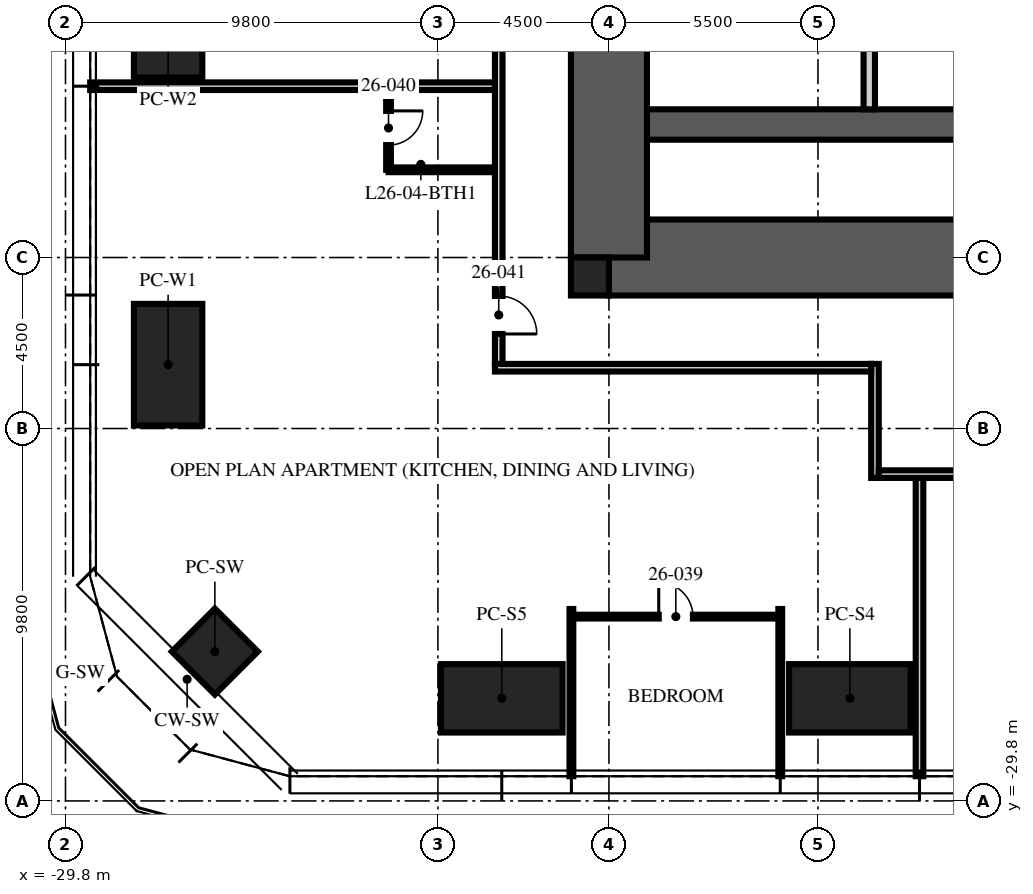
"""IFC4 building model, lengths in metres.
Left out: names, types, materials, properties, quantities, classifications, styles, units other than length and angle.
Written with IfcOpenShell. Run it as: python <this file> out.ifc"""

import sys

from ifc_helpers import new_model, si_unit, direction, frame, frame_2d, origin, origin_2d, place, context, subcontext, project, spatial, rectangle, hollow_rectangle, extrude, element, fill, save


model = new_model("IFC4")
c1 = context("Model", 3, precision=1e-05, world=origin(), true_north=direction((0.0, 1.0)))
c2 = subcontext(c1, "Body", "Model", "MODEL_VIEW")
j1 = project(units=[si_unit("LENGTHUNIT", "METRE"), si_unit("PLANEANGLEUNIT", "RADIAN")], contexts=[c1])
p1 = place(None, origin())
s1 = spatial("IfcSite", under=j1, at=p1, CompositionType="ELEMENT")
p2 = place(p1, origin())
s2 = spatial("IfcBuilding", under=s1, at=p2, CompositionType="ELEMENT")
p3 = place(p2, frame((0.0, 0.0, 107.25)))
s3 = spatial("IfcBuildingStorey", under=s2, at=p3, CompositionType="ELEMENT", Elevation=107.25)
p4 = place(p3, frame((-15.5, -15.5, -0.25), z_axis=(0.0, 0.0, 1.0), x_axis=(1.0, 0.0, 0.0)))
e1 = element("IfcWall", 1, at=p4, inside=s3, PredefinedType="SHEAR", context=c2, shape_type="SweptSolid", body=[
    extrude(rectangle(XDim=31.0, YDim=2.0, at=frame_2d((15.5, 0.0))), origin(), (0.0, 0.0, 1.0), 3.75),
])
p5 = place(p4, frame((10.4, 0.0, 0.25)))
e2 = element("IfcOpeningElement", 2, at=p5, cuts=e1, PredefinedType="OPENING", context=c2, shape_type="SweptSolid", body=[
    extrude(rectangle(XDim=1.1, YDim=2.1, at=frame_2d((0.55, 1.05))), frame((0.0, 1.01, 0.0), z_axis=(0.0, -1.0, 0.0), x_axis=(1.0, 0.0, 0.0)), (0.0, 0.0, 1.0), 2.02),
])
p6 = place(p4, frame((13.5, 0.0, 0.25)))
e3 = element("IfcOpeningElement", 3, at=p6, cuts=e1, PredefinedType="OPENING", context=c2, shape_type="SweptSolid", body=[
    extrude(rectangle(XDim=1.1, YDim=2.1, at=frame_2d((0.55, 1.05))), frame((0.0, 1.01, 0.0), z_axis=(0.0, -1.0, 0.0), x_axis=(1.0, 0.0, 0.0)), (0.0, 0.0, 1.0), 2.02),
])
p7 = place(p4, frame((16.6, 0.0, 0.25)))
e4 = element("IfcOpeningElement", 4, at=p7, cuts=e1, PredefinedType="OPENING", context=c2, shape_type="SweptSolid", body=[
    extrude(rectangle(XDim=1.1, YDim=2.1, at=frame_2d((0.55, 1.05))), frame((0.0, 1.01, 0.0), z_axis=(0.0, -1.0, 0.0), x_axis=(1.0, 0.0, 0.0)), (0.0, 0.0, 1.0), 2.02),
])
p8 = place(p3, frame((-15.5, -12.0, -0.25), z_axis=(0.0, 0.0, 1.0), x_axis=(1.0, 0.0, 0.0)))
e5 = element("IfcWall", 5, at=p8, inside=s3, PredefinedType="SHEAR", context=c2, shape_type="SweptSolid", body=[
    extrude(rectangle(XDim=31.0, YDim=0.8, at=frame_2d((15.5, 0.0))), origin(), (0.0, 0.0, 1.0), 3.75),
])
p9 = place(p3, frame((-15.5, -15.5, -0.25), z_axis=(0.0, 0.0, 1.0), x_axis=(0.0, 1.0, 0.0)))
e6 = element("IfcWall", 6, at=p9, inside=s3, PredefinedType="SHEAR", context=c2, shape_type="SweptSolid", body=[
    extrude(rectangle(XDim=31.0, YDim=2.0, at=frame_2d((15.5, 0.0))), origin(), (0.0, 0.0, 1.0), 3.75),
])
p10 = place(p9, frame((6.5, 0.0, 0.25)))
e7 = element("IfcOpeningElement", 7, at=p10, cuts=e6, PredefinedType="OPENING", context=c2, shape_type="SweptSolid", body=[
    extrude(rectangle(XDim=1.2, YDim=2.1, at=frame_2d((0.6, 1.05))), frame((0.0, 1.01, 0.0), z_axis=(0.0, -1.0, 0.0), x_axis=(1.0, 0.0, 0.0)), (0.0, 0.0, 1.0), 2.02),
])
p11 = place(p9, frame((23.0, 0.0, 0.25)))
e8 = element("IfcOpeningElement", 8, at=p11, cuts=e6, PredefinedType="OPENING", context=c2, shape_type="SweptSolid", body=[
    extrude(rectangle(XDim=1.8, YDim=2.1, at=frame_2d((0.9, 1.05))), frame((0.0, 1.01, 0.0), z_axis=(0.0, -1.0, 0.0), x_axis=(1.0, 0.0, 0.0)), (0.0, 0.0, 1.0), 2.02),
])
p12 = place(p3, frame((-16.0, -16.0, -0.25), z_axis=(0.0, 0.0, 1.0), x_axis=(1.0, 0.0, 0.0)))
e9 = element("IfcColumn", 9, at=p12, inside=s3, PredefinedType="COLUMN", context=c2, shape_type="SweptSolid", body=[
    extrude(rectangle(XDim=1.0, YDim=1.0, at=origin_2d()), origin(), (0.0, 0.0, 1.0), 3.75),
])
p13 = place(p3, frame((-9.16, -27.1, -0.07), z_axis=(0.0, 0.0, 1.0), x_axis=(1.0, 0.0, 0.0)))
e10 = element("IfcColumn", 10, at=p13, inside=s3, PredefinedType="COLUMN", context=c2, shape_type="SweptSolid", body=[
    extrude(hollow_rectangle(XDim=3.2, YDim=1.8, WallThickness=0.2, at=origin_2d()), origin(), (0.0, 0.0, 1.0), 3.82),
])
for number, where, z_axis, x_axis in (
    (11, (-18.32, -27.1, 0.08), (0.0, 0.0, 1.0), (1.0, 0.0, 0.0)),
    (12, (-27.1, -18.32, 0.08), (0.0, 0.0, 1.0), (0.0, 1.0, 0.0)),
):
    element("IfcColumn", number, at=place(p3, frame(where, z_axis=z_axis, x_axis=x_axis)), inside=s3, PredefinedType="COLUMN", context=c2, shape_type="SweptSolid", body=[
        extrude(hollow_rectangle(XDim=3.2, YDim=1.8, WallThickness=0.2, at=origin_2d()), origin(), (0.0, 0.0, 1.0), 3.67),
    ])
p14 = place(p3, frame((-27.1, -9.16, -0.07), z_axis=(0.0, 0.0, 1.0), x_axis=(0.0, 1.0, 0.0)))
e13 = element("IfcColumn", 13, at=p14, inside=s3, PredefinedType="COLUMN", context=c2, shape_type="SweptSolid", body=[
    extrude(hollow_rectangle(XDim=3.2, YDim=1.8, WallThickness=0.2, at=origin_2d()), origin(), (0.0, 0.0, 1.0), 3.82),
])
p15 = place(p3, frame((-25.87, -25.87, -0.19), z_axis=(0.0, 0.0, 1.0), x_axis=(0.707106781187, -0.707106781187, 0.0)))
e14 = element("IfcColumn", 14, at=p15, inside=s3, PredefinedType="COLUMN", context=c2, shape_type="SweptSolid", body=[
    extrude(hollow_rectangle(XDim=1.6, YDim=1.6, WallThickness=0.1, at=origin_2d()), origin(), (0.0, 0.0, 1.0), 3.94),
])
p16 = place(p3, frame((-8.65, -11.6, 0.0), z_axis=(0.0, 0.0, 1.0), x_axis=(0.0, 1.0, 0.0)))
e15 = element("IfcWall", 15, at=p16, inside=s3, PredefinedType="PARTITIONING", context=c2, shape_type="SweptSolid", body=[
    extrude(rectangle(XDim=6.7, YDim=0.3, at=frame_2d((3.35, 0.0))), origin(), (0.0, 0.0, 1.0), 3.5),
])
p17 = place(p16, frame((2.85, 0.0, 0.0)))
e16 = element("IfcOpeningElement", 16, at=p17, cuts=e15, PredefinedType="OPENING", context=c2, shape_type="SweptSolid", body=[
    extrude(rectangle(XDim=1.1, YDim=2.1, at=frame_2d((0.55, 1.05))), frame((0.0, 0.16, 0.0), z_axis=(0.0, -1.0, 0.0), x_axis=(1.0, 0.0, 0.0)), (0.0, 0.0, 1.0), 0.32),
])
p18 = place(p3, frame((-18.5, -10.992, 0.0), z_axis=(0.0, 0.0, 1.0), x_axis=(-1.0, 0.0, 0.0)))
e17 = element("IfcWall", 17, at=p18, inside=s3, PredefinedType="PARTITIONING", context=c2, shape_type="SweptSolid", body=[
    extrude(rectangle(XDim=10.65, YDim=0.2, at=frame_2d((5.325, 0.0))), origin(), (0.0, 0.0, 1.0), 2.81),
])
for number, where, z_axis, x_axis in (
    (18, (-16.488, -24.75, 0.0), (0.0, 0.0, 1.0), (0.0, -1.0, 0.0)),
    (19, (-10.992, -24.75, 0.0), (0.0, 0.0, 1.0), (0.0, -1.0, 0.0)),
):
    element("IfcWall", number, at=place(p3, frame(where, z_axis=z_axis, x_axis=x_axis)), inside=s3, PredefinedType="PARTITIONING", context=c2, shape_type="SweptSolid", body=[
        extrude(rectangle(XDim=4.4, YDim=0.1, at=frame_2d((2.2, 0.0))), origin(), (0.0, 0.0, 1.0), 2.81),
    ])
p19 = place(p3, frame((-7.328, -21.3, 0.0), z_axis=(0.0, 0.0, 1.0), x_axis=(0.0, -1.0, 0.0)))
e20 = element("IfcWall", 20, at=p19, inside=s3, PredefinedType="PARTITIONING", context=c2, shape_type="SweptSolid", body=[
    extrude(rectangle(XDim=7.85, YDim=0.2, at=frame_2d((3.925, 0.0))), origin(), (0.0, 0.0, 1.0), 2.81),
])
p20 = place(p3, frame((-16.488, -24.95, 0.0), z_axis=(0.0, 0.0, 1.0), x_axis=(1.0, 0.0, 0.0)))
e21 = element("IfcWall", 21, at=p20, inside=s3, PredefinedType="PARTITIONING", context=c2, shape_type="SweptSolid", body=[
    extrude(rectangle(XDim=5.496, YDim=0.1, at=frame_2d((2.748, 0.0))), origin(), (0.0, 0.0, 1.0), 2.81),
])
p21 = place(p20, frame((2.298, 0.0, 0.0)))
e22 = element("IfcOpeningElement", 22, at=p21, cuts=e21, PredefinedType="OPENING", context=c2, shape_type="SweptSolid", body=[
    extrude(rectangle(XDim=0.9, YDim=2.1, at=frame_2d((0.45, 1.05))), frame((0.0, 0.06, 0.0), z_axis=(0.0, -1.0, 0.0), x_axis=(1.0, 0.0, 0.0)), (0.0, 0.0, 1.0), 0.12),
])
p22 = place(p3, frame((-21.3, -10.992, 0.0), z_axis=(0.0, 0.0, 1.0), x_axis=(0.0, -1.0, 0.0)))
e23 = element("IfcWall", 23, at=p22, inside=s3, PredefinedType="PARTITIONING", context=c2, shape_type="SweptSolid", body=[
    extrude(rectangle(XDim=2.2, YDim=0.125, at=frame_2d((1.1, 0.0))), origin(), (0.0, 0.0, 1.0), 3.5),
])
p23 = place(p22, frame((0.65, 0.0, 0.0)))
e24 = element("IfcOpeningElement", 24, at=p23, cuts=e23, PredefinedType="OPENING", context=c2, shape_type="SweptSolid", body=[
    extrude(rectangle(XDim=0.9, YDim=2.1, at=frame_2d((0.45, 1.05))), frame((0.0, 0.073, 0.0), z_axis=(0.0, -1.0, 0.0), x_axis=(1.0, 0.0, 0.0)), (0.0, 0.0, 1.0), 0.145),
])
p24 = place(p3, frame((-18.5, -13.192, 0.0), z_axis=(0.0, 0.0, 1.0), x_axis=(-1.0, 0.0, 0.0)))
e25 = element("IfcWall", 25, at=p24, inside=s3, PredefinedType="PARTITIONING", context=c2, shape_type="SweptSolid", body=[
    extrude(rectangle(XDim=2.8, YDim=0.125, at=frame_2d((1.4, 0.0))), origin(), (0.0, 0.0, 1.0), 3.5),
])
p25 = place(p3, frame((-18.4, 5.328, 0.0), z_axis=(0.0, 0.0, 1.0), x_axis=(0.0, -1.0, 0.0)))
e26 = element("IfcWall", 26, at=p25, inside=s3, PredefinedType="PARTITIONING", context=c2, shape_type="SweptSolid", body=[
    extrude(rectangle(XDim=23.628, YDim=0.2, at=frame_2d((11.814, 0.0))), origin(), (0.0, 0.0, 1.0), 2.3),
])
p26 = place(p25, frame((21.84, 0.0, 0.0)))
e27 = element("IfcOpeningElement", 27, at=p26, cuts=e26, PredefinedType="OPENING", context=c2, shape_type="SweptSolid", body=[
    extrude(rectangle(XDim=1.0, YDim=2.2, at=frame_2d((0.5, 1.1))), frame((0.0, 0.11, 0.0), z_axis=(0.0, -1.0, 0.0), x_axis=(1.0, 0.0, 0.0)), (0.0, 0.0, 1.0), 0.22),
])
p27 = place(p3, frame((-8.5, -18.3, 0.0), z_axis=(0.0, 0.0, 1.0), x_axis=(0.0, -1.0, 0.0)))
e28 = element("IfcWall", 28, at=p27, inside=s3, PredefinedType="PARTITIONING", context=c2, shape_type="SweptSolid", body=[
    extrude(rectangle(XDim=3.0, YDim=0.2, at=frame_2d((1.5, 0.0))), origin(), (0.0, 0.0, 1.0), 3.5),
])
p28 = place(p3, frame((5.4, -21.2, 0.0), z_axis=(0.0, 0.0, 1.0), x_axis=(-1.0, 0.0, 0.0)))
e29 = element("IfcWall", 29, at=p28, inside=s3, PredefinedType="PARTITIONING", context=c2, shape_type="SweptSolid", body=[
    extrude(rectangle(XDim=13.8, YDim=0.2, at=frame_2d((6.9, 0.0))), origin(), (0.0, 0.0, 1.0), 2.7),
])
p29 = place(p28, frame((0.958, 0.0, 0.0)))
e30 = element("IfcOpeningElement", 30, at=p29, cuts=e29, PredefinedType="OPENING", context=c2, shape_type="SweptSolid", body=[
    extrude(rectangle(XDim=1.0, YDim=2.2, at=frame_2d((0.5, 1.1))), frame((0.0, 0.11, 0.0), z_axis=(0.0, -1.0, 0.0), x_axis=(1.0, 0.0, 0.0)), (0.0, 0.0, 1.0), 0.22),
])
p30 = place(p3, frame((-8.6, -18.4, 0.0), z_axis=(0.0, 0.0, 1.0), x_axis=(-1.0, 0.0, 0.0)))
e31 = element("IfcWall", 31, at=p30, inside=s3, PredefinedType="PARTITIONING", context=c2, shape_type="SweptSolid", body=[
    extrude(rectangle(XDim=9.9, YDim=0.2, at=frame_2d((4.95, 0.0))), origin(), (0.0, 0.0, 1.0), 2.3),
])
p31 = place(p21, origin())
e32 = element("IfcDoor", 32, at=p31, inside=s3, OperationType="SINGLE_SWING_LEFT", PredefinedType="DOOR", context=c2, shape_type="SweptSolid", body=[
    extrude(rectangle(XDim=0.9, YDim=2.1, at=frame_2d((0.45, 1.05))), frame((0.0, 0.025, 0.0), z_axis=(0.0, -1.0, 0.0), x_axis=(1.0, 0.0, 0.0)), (0.0, 0.0, 1.0), 0.05),
])
fill(e22, e32)
p32 = place(p23, origin())
e33 = element("IfcDoor", 33, at=p32, inside=s3, OperationType="SINGLE_SWING_LEFT", PredefinedType="DOOR", context=c2, shape_type="SweptSolid", body=[
    extrude(rectangle(XDim=0.9, YDim=2.1, at=frame_2d((0.45, 1.05))), frame((0.0, 0.025, 0.0), z_axis=(0.0, -1.0, 0.0), x_axis=(1.0, 0.0, 0.0)), (0.0, 0.0, 1.0), 0.05),
])
fill(e24, e33)
p33 = place(p26, origin())
e34 = element("IfcDoor", 34, at=p33, inside=s3, OperationType="SINGLE_SWING_RIGHT", PredefinedType="DOOR", context=c2, shape_type="SweptSolid", body=[
    extrude(rectangle(XDim=1.0, YDim=2.2, at=frame_2d((0.5, 1.1))), frame((0.0, 0.025, 0.0), z_axis=(0.0, -1.0, 0.0), x_axis=(1.0, 0.0, 0.0)), (0.0, 0.0, 1.0), 0.05),
])
fill(e27, e34)
save(model, sys.argv[1])
